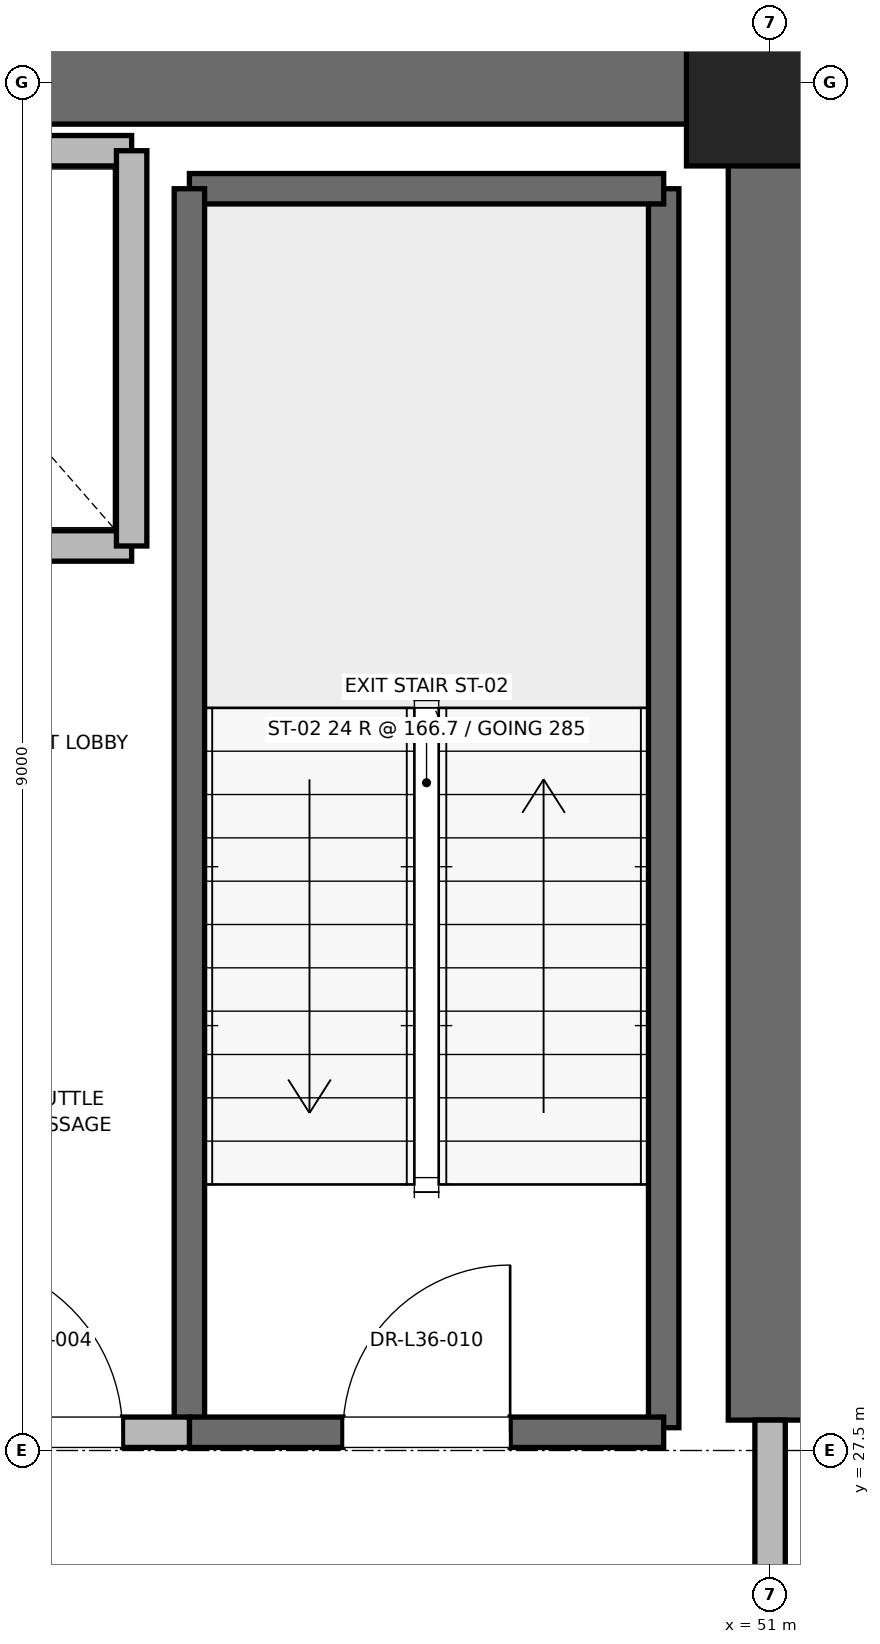
"""IFC4 building model, lengths in metres.
Left out: names, types, materials, properties, quantities, classifications, styles, units other than length and angle.
Written with IfcOpenShell. Run it as: python <this file> out.ifc"""

import sys

from ifc_helpers import new_model, si_unit, direction, frame, frame_2d, origin, origin_2d, place, context, subcontext, project, spatial, rectangle, extrude, element, fill, save


model = new_model("IFC4")
c1 = context("Model", 3, precision=1e-05, world=origin(), true_north=direction((0.0, 1.0)))
c2 = subcontext(c1, "Body", "Model", "MODEL_VIEW")
j1 = project(units=[si_unit("LENGTHUNIT", "METRE"), si_unit("PLANEANGLEUNIT", "RADIAN")], contexts=[c1])
p1 = place(None, origin())
s1 = spatial("IfcSite", under=j1, at=p1, CompositionType="ELEMENT")
p2 = place(p1, origin())
s2 = spatial("IfcBuilding", under=s1, at=p2, CompositionType="ELEMENT")
p3 = place(p2, frame((0.0, 0.0, 156.4)))
s3 = spatial("IfcBuildingStorey", under=s2, at=p3, CompositionType="ELEMENT", Elevation=156.4)
p4 = place(p3, frame((51.0, 36.5, 0.0), z_axis=(0.0, 0.0, 1.0), x_axis=(1.0, 0.0, 0.0)))
e1 = element("IfcColumn", 1, at=p4, inside=s3, PredefinedType="PILASTER", context=c2, shape_type="SweptSolid", body=[
    extrude(rectangle(XDim=1.1, YDim=1.1, at=origin_2d()), origin(), (0.0, 0.0, 1.0), 4.0),
])
p5 = place(p3, frame((45.2, 36.5, 0.0), z_axis=(0.0, 0.0, 1.0), x_axis=(1.0, 0.0, 0.0)))
e2 = element("IfcWall", 2, at=p5, inside=s3, PredefinedType="SHEAR", context=c2, shape_type="SweptSolid", body=[
    extrude(rectangle(XDim=5.8, YDim=0.55, at=frame_2d((2.9, 0.0))), origin(), (0.0, 0.0, 1.0), 3.775),
])
p6 = place(p3, frame((51.0, 27.7, 0.0), z_axis=(0.0, 0.0, 1.0), x_axis=(0.0, 1.0, 0.0)))
e3 = element("IfcWall", 3, at=p6, inside=s3, PredefinedType="SHEAR", context=c2, shape_type="SweptSolid", body=[
    extrude(rectangle(XDim=8.8, YDim=0.55, at=frame_2d((4.4, 0.0))), origin(), (0.0, 0.0, 1.0), 3.775),
])
p7 = place(p3, frame((50.3, 27.65, 0.0), z_axis=(0.0, 0.0, 1.0), x_axis=(0.0, 1.0, 0.0)))
e4 = element("IfcWall", 4, at=p7, inside=s3, PredefinedType="SOLIDWALL", context=c2, shape_type="SweptSolid", body=[
    extrude(rectangle(XDim=8.15, YDim=0.2, at=frame_2d((4.075, 0.0))), origin(), (0.0, 0.0, 1.0), 3.775),
])
p8 = place(p3, frame((47.18, 35.8, 0.0), z_axis=(0.0, 0.0, 1.0), x_axis=(1.0, 0.0, 0.0)))
e5 = element("IfcWall", 5, at=p8, inside=s3, PredefinedType="SOLIDWALL", context=c2, shape_type="SweptSolid", body=[
    extrude(rectangle(XDim=3.12, YDim=0.2, at=frame_2d((1.56, 0.0))), origin(), (0.0, 0.0, 1.0), 3.775),
])
p9 = place(p3, frame((47.18, 27.62, 0.0), z_axis=(0.0, 0.0, 1.0), x_axis=(0.0, 1.0, 0.0)))
e6 = element("IfcWall", 6, at=p9, inside=s3, PredefinedType="SOLIDWALL", context=c2, shape_type="SweptSolid", body=[
    extrude(rectangle(XDim=8.18, YDim=0.2, at=frame_2d((4.09, 0.0))), origin(), (0.0, 0.0, 1.0), 3.775),
])
p10 = place(p3, frame((47.18, 27.62, 0.0), z_axis=(0.0, 0.0, 1.0), x_axis=(1.0, 0.0, 0.0)))
e7 = element("IfcWall", 7, at=p10, inside=s3, PredefinedType="SOLIDWALL", context=c2, shape_type="SweptSolid", body=[
    extrude(rectangle(XDim=3.12, YDim=0.2, at=frame_2d((1.56, 0.0))), origin(), (0.0, 0.0, 1.0), 3.775),
])
p11 = place(p10, frame((1.01, 0.0, 0.0)))
e8 = element("IfcOpeningElement", 8, at=p11, cuts=e7, PredefinedType="OPENING", context=c2, shape_type="SweptSolid", body=[
    extrude(rectangle(XDim=1.1, YDim=2.15, at=frame_2d((0.55, 1.075))), frame((0.0, 0.1, 0.0), z_axis=(0.0, -1.0, 0.0), x_axis=(1.0, 0.0, 0.0)), (0.0, 0.0, 1.0), 0.2),
])
p12 = place(p3, frame((45.15, 27.62, 0.0), z_axis=(0.0, 0.0, 1.0), x_axis=(1.0, 0.0, 0.0)))
e9 = element("IfcWall", 9, at=p12, inside=s3, PredefinedType="PARTITIONING", context=c2, shape_type="SweptSolid", body=[
    extrude(rectangle(XDim=2.03, YDim=0.2, at=frame_2d((1.015, 0.0))), origin(), (0.0, 0.0, 1.0), 3.775),
])
p13 = place(p12, frame((0.44, 0.0, 0.0)))
e10 = element("IfcOpeningElement", 10, at=p13, cuts=e9, PredefinedType="OPENING", context=c2, shape_type="SweptSolid", body=[
    extrude(rectangle(XDim=1.15, YDim=2.2, at=frame_2d((0.575, 1.1))), frame((0.0, 0.1, 0.0), z_axis=(0.0, -1.0, 0.0), x_axis=(1.0, 0.0, 0.0)), (0.0, 0.0, 1.0), 0.2),
])
p14 = place(p3, frame((51.0, 24.3, 0.0), z_axis=(0.0, 0.0, 1.0), x_axis=(0.0, 1.0, 0.0)))
e11 = element("IfcWall", 11, at=p14, inside=s3, PredefinedType="PARTITIONING", context=c2, shape_type="SweptSolid", body=[
    extrude(rectangle(XDim=3.4, YDim=0.2, at=frame_2d((1.7, 0.0))), origin(), (0.0, 0.0, 1.0), 2.755),
])
p15 = place(p14, frame((1.125, 0.0, 0.0)))
e12 = element("IfcOpeningElement", 12, at=p15, cuts=e11, PredefinedType="OPENING", context=c2, shape_type="SweptSolid", body=[
    extrude(rectangle(XDim=1.15, YDim=2.2, at=frame_2d((0.575, 1.1))), frame((0.0, 0.1, 0.0), z_axis=(0.0, -1.0, 0.0), x_axis=(1.0, 0.0, 0.0)), (0.0, 0.0, 1.0), 0.2),
])
p16 = place(p3, frame((44.5, 33.45, 0.0), z_axis=(0.0, 0.0, 1.0), x_axis=(1.0, 0.0, 0.0)))
e13 = element("IfcWall", 13, at=p16, inside=s3, PredefinedType="SOLIDWALL", context=c2, shape_type="SweptSolid", body=[
    extrude(rectangle(XDim=2.3, YDim=0.2, at=frame_2d((1.15, 0.0))), origin(), (0.0, 0.0, 1.0), 3.775),
])
p17 = place(p3, frame((46.8, 36.05, 0.0), z_axis=(0.0, 0.0, 1.0), x_axis=(-1.0, 0.0, 0.0)))
e14 = element("IfcWall", 14, at=p17, inside=s3, PredefinedType="SOLIDWALL", context=c2, shape_type="SweptSolid", body=[
    extrude(rectangle(XDim=2.3, YDim=0.2, at=frame_2d((1.15, 0.0))), origin(), (0.0, 0.0, 1.0), 2.755),
])
p18 = place(p3, frame((46.8, 33.45, 0.0), z_axis=(0.0, 0.0, 1.0), x_axis=(0.0, 1.0, 0.0)))
e15 = element("IfcWall", 15, at=p18, inside=s3, PredefinedType="SOLIDWALL", context=c2, shape_type="SweptSolid", body=[
    extrude(rectangle(XDim=2.6, YDim=0.2, at=frame_2d((1.3, 0.0))), origin(), (0.0, 0.0, 1.0), 3.775),
])
p19 = place(p11, origin())
e16 = element("IfcDoor", 16, at=p19, inside=s3, OperationType="SINGLE_SWING_RIGHT", PredefinedType="DOOR", context=c2, shape_type="SweptSolid", body=[
    extrude(rectangle(XDim=1.1, YDim=2.15, at=frame_2d((0.55, 1.075))), frame((0.0, 0.025, 0.0), z_axis=(0.0, -1.0, 0.0), x_axis=(1.0, 0.0, 0.0)), (0.0, 0.0, 1.0), 0.05),
])
fill(e8, e16)
p20 = place(p13, origin())
e17 = element("IfcDoor", 17, at=p20, inside=s3, OperationType="SINGLE_SWING_LEFT", PredefinedType="DOOR", context=c2, shape_type="SweptSolid", body=[
    extrude(rectangle(XDim=1.15, YDim=2.2, at=frame_2d((0.575, 1.1))), frame((0.0, 0.025, 0.0), z_axis=(0.0, -1.0, 0.0), x_axis=(1.0, 0.0, 0.0)), (0.0, 0.0, 1.0), 0.05),
])
fill(e10, e17)
save(model, sys.argv[1])
